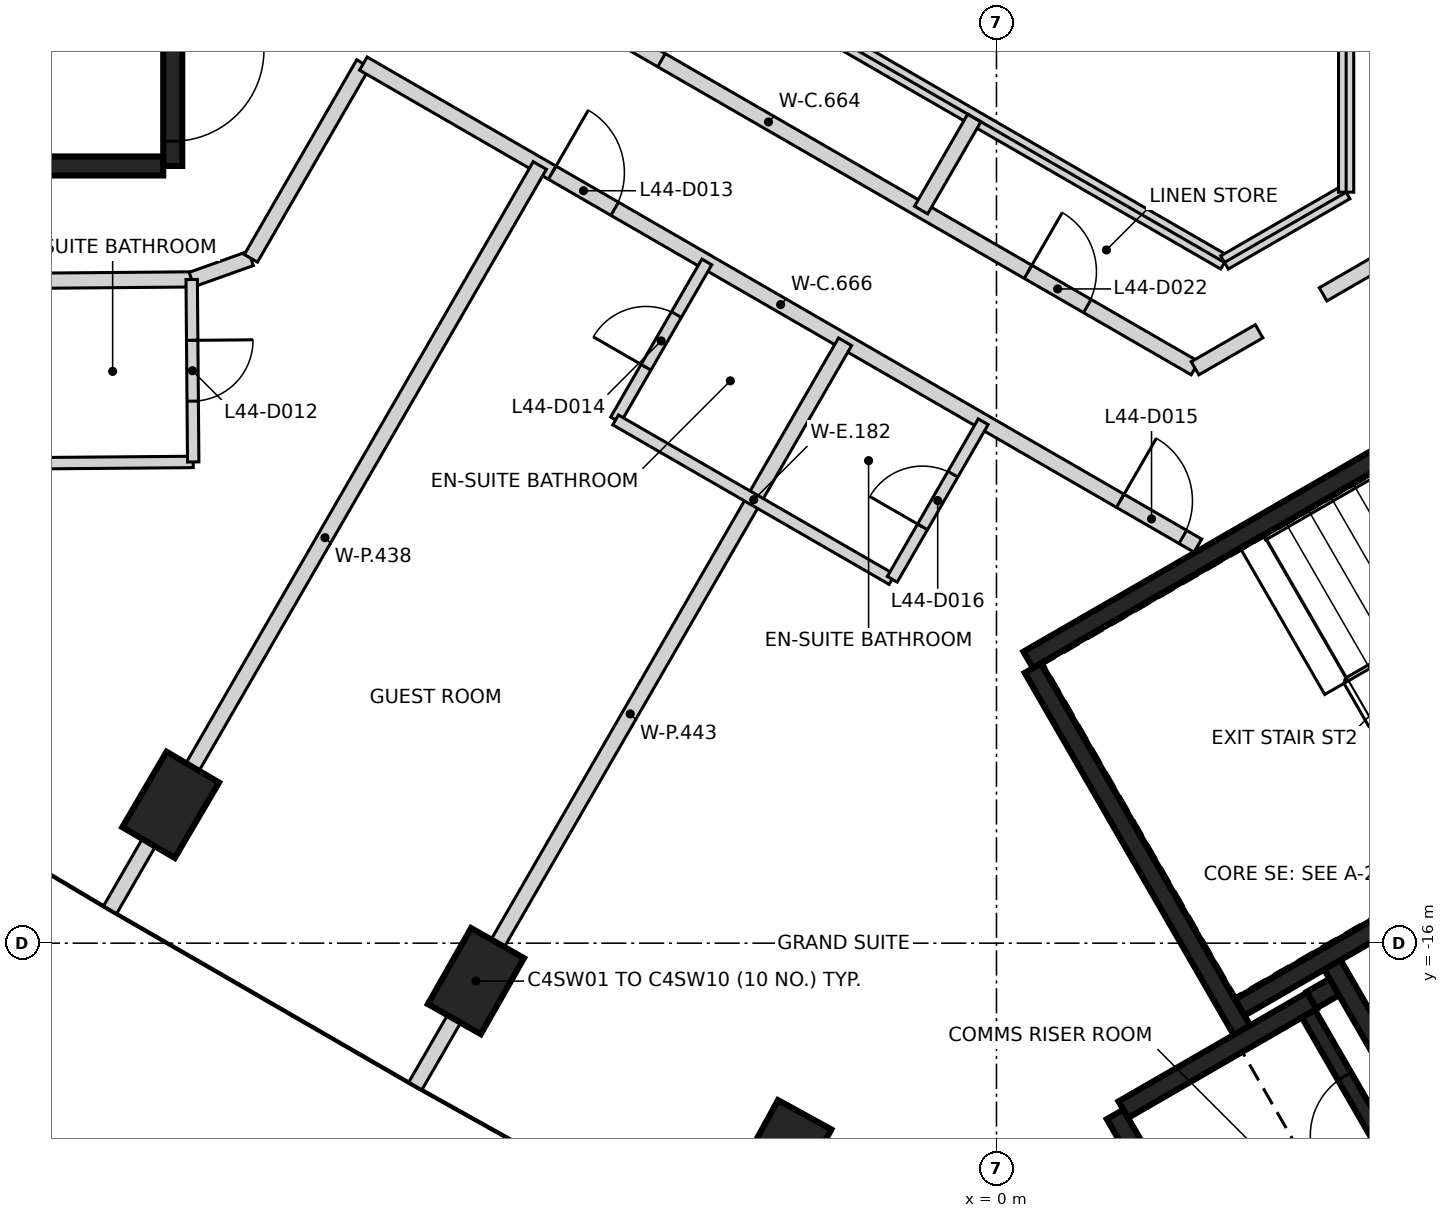
"""IFC4 building model, lengths in metres.
Left out: names, types, materials, properties, quantities, classifications, styles, units other than length and angle.
Written with IfcOpenShell. Run it as: python <this file> out.ifc"""

import sys

from ifc_helpers import new_model, si_unit, direction, frame, frame_2d, origin, origin_2d, place, context, subcontext, project, spatial, rectangle, extrude, element, fill, save


model = new_model("IFC4")
c1 = context("Model", 3, precision=1e-05, world=origin(), true_north=direction((0.0, 1.0)))
c2 = subcontext(c1, "Body", "Model", "MODEL_VIEW")
j1 = project(units=[si_unit("LENGTHUNIT", "METRE"), si_unit("PLANEANGLEUNIT", "RADIAN")], contexts=[c1])
p1 = place(None, origin())
s1 = spatial("IfcSite", under=j1, at=p1, CompositionType="ELEMENT")
p2 = place(p1, origin())
s2 = spatial("IfcBuilding", under=s1, at=p2, CompositionType="ELEMENT")
p3 = place(p2, frame((0.0, 0.0, 179.2)))
s3 = spatial("IfcBuildingStorey", under=s2, at=p3, CompositionType="ELEMENT", Elevation=179.2)
for number, where, z_axis, x_axis in (
    (1, (-10.864, -14.18, -0.35), (0.0, 0.0, 1.0), (0.506, 0.862, 0.0)),
    (2, (-6.848, -16.499, -0.35), (0.0, 0.0, 1.0), (0.494, 0.87, 0.0)),
    (3, (-2.8, -18.762, -0.35), (0.0, 0.0, 1.0), (0.482, 0.876, 0.0)),
):
    element("IfcColumn", number, at=place(p3, frame(where, z_axis=z_axis, x_axis=x_axis)), inside=s3, PredefinedType="COLUMN", context=c2, shape_type="SweptSolid", body=[
        extrude(rectangle(XDim=1.15, YDim=0.8, at=origin_2d()), origin(), (0.0, 0.0, 1.0), 3.6),
    ])
p4 = place(p3, frame((-10.837, 5.775, 0.0), z_axis=(0.0, 0.0, 1.0), x_axis=(0.0, -1.0, 0.0)))
e4 = element("IfcWall", 4, at=p4, inside=s3, PredefinedType="SHEAR", context=c2, shape_type="SweptSolid", body=[
    extrude(rectangle(XDim=11.55, YDim=0.25, at=frame_2d((5.775, 0.0))), origin(), (0.0, 0.0, 1.0), 3.25),
])
p5 = place(p4, frame((10.025, 0.0, 0.0)))
e5 = element("IfcOpeningElement", 5, at=p5, cuts=e4, PredefinedType="OPENING", context=c2, shape_type="SweptSolid", body=[
    extrude(rectangle(XDim=1.2, YDim=2.1, at=frame_2d((0.6, 1.05))), frame((0.0, 0.135, 0.0), z_axis=(0.0, -1.0, 0.0), x_axis=(1.0, 0.0, 0.0)), (0.0, 0.0, 1.0), 0.27),
])
p6 = place(p4, frame((8.725, 0.0, 0.0)))
e6 = element("IfcOpeningElement", 6, at=p6, cuts=e4, PredefinedType="OPENING", context=c2, shape_type="SweptSolid", body=[
    extrude(rectangle(XDim=1.2, YDim=2.1, at=frame_2d((0.6, 1.05))), frame((0.0, 0.135, 0.0), z_axis=(0.0, -1.0, 0.0), x_axis=(1.0, 0.0, 0.0)), (0.0, 0.0, 1.0), 0.27),
])
p7 = place(p3, frame((-10.963, -5.775, 0.0), z_axis=(0.0, 0.0, 1.0), x_axis=(-1.0, 0.0, 0.0)))
e7 = element("IfcWall", 7, at=p7, inside=s3, PredefinedType="SHEAR", context=c2, shape_type="SweptSolid", body=[
    extrude(rectangle(XDim=5.225, YDim=0.25, at=frame_2d((2.612, 0.0))), origin(), (0.0, 0.0, 1.0), 3.25),
])
p8 = place(p3, frame((0.417, -12.273, 0.0), z_axis=(0.0, 0.0, 1.0), x_axis=(0.866021906294, 0.500006057782, 0.0)))
e8 = element("IfcWall", 8, at=p8, inside=s3, PredefinedType="SHEAR", context=c2, shape_type="SweptSolid", body=[
    extrude(rectangle(XDim=11.55, YDim=0.25, at=frame_2d((5.775, 0.0))), origin(), (0.0, 0.0, 1.0), 3.25),
])
p9 = place(p8, frame((10.025, 0.0, 0.0)))
e9 = element("IfcOpeningElement", 9, at=p9, cuts=e8, PredefinedType="OPENING", context=c2, shape_type="SweptSolid", body=[
    extrude(rectangle(XDim=1.2, YDim=2.1, at=frame_2d((0.6, 1.05))), frame((0.0, 0.135, 0.0), z_axis=(0.0, -1.0, 0.0), x_axis=(1.0, 0.0, 0.0)), (0.0, 0.0, 1.0), 0.27),
])
p10 = place(p8, frame((8.725, 0.0, 0.0)))
e10 = element("IfcOpeningElement", 10, at=p10, cuts=e8, PredefinedType="OPENING", context=c2, shape_type="SweptSolid", body=[
    extrude(rectangle(XDim=1.2, YDim=2.1, at=frame_2d((0.6, 1.05))), frame((0.0, 0.135, 0.0), z_axis=(0.0, -1.0, 0.0), x_axis=(1.0, 0.0, 0.0)), (0.0, 0.0, 1.0), 0.27),
])
p11 = place(p3, frame((3.235, -17.153, 0.0), z_axis=(0.0, 0.0, 1.0), x_axis=(-0.500008851346, 0.866020293397, 0.0)))
e11 = element("IfcWall", 11, at=p11, inside=s3, PredefinedType="SHEAR", context=c2, shape_type="SweptSolid", body=[
    extrude(rectangle(XDim=5.51, YDim=0.25, at=frame_2d((2.755, 0.0))), origin(), (0.0, 0.0, 1.0), 3.25),
])
p12 = place(p3, frame((3.085, -20.894, 0.0), z_axis=(0.0, 0.0, 1.0), x_axis=(-0.499978833458, 0.866037623948, 0.0)))
e12 = element("IfcWall", 12, at=p12, inside=s3, PredefinedType="SHEAR", context=c2, shape_type="SweptSolid", body=[
    extrude(rectangle(XDim=3.05, YDim=0.25, at=frame_2d((1.525, 0.0))), origin(), (0.0, 0.0, 1.0), 3.25),
])
p13 = place(p3, frame((1.669, -18.19, 0.0), z_axis=(0.0, 0.0, 1.0), x_axis=(0.866042235819, 0.499970844928, 0.0)))
e13 = element("IfcWall", 13, at=p13, inside=s3, PredefinedType="SHEAR", context=c2, shape_type="SweptSolid", body=[
    extrude(rectangle(XDim=2.865, YDim=0.25, at=frame_2d((1.432, 0.0))), origin(), (0.0, 0.0, 1.0), 3.25),
])
p14 = place(p3, frame((4.414, -16.276, 0.0), z_axis=(0.0, 0.0, 1.0), x_axis=(0.500003324108, -0.866023484601, 0.0)))
e14 = element("IfcWall", 14, at=p14, inside=s3, PredefinedType="SHEAR", context=c2, shape_type="SweptSolid", body=[
    extrude(rectangle(XDim=3.085, YDim=0.25, at=frame_2d((1.542, 0.0))), origin(), (0.0, 0.0, 1.0), 3.25),
])
p15 = place(p3, frame((5.322, -15.619, 0.0), z_axis=(0.0, 0.0, 1.0), x_axis=(-0.866026229868, -0.499998569178, 0.0)))
e15 = element("IfcWall", 15, at=p15, inside=s3, PredefinedType="SHEAR", context=c2, shape_type="SweptSolid", body=[
    extrude(rectangle(XDim=2.449, YDim=0.25, at=frame_2d((1.225, 0.0))), origin(), (0.0, 0.0, 1.0), 3.25),
])
p16 = place(p3, frame((4.145, -16.749, 0.0), z_axis=(0.0, 0.0, 1.0), x_axis=(0.866185586049, 0.49972245349, 0.0)))
e16 = element("IfcWall", 16, at=p16, inside=s3, PredefinedType="SHEAR", context=c2, shape_type="SweptSolid", body=[
    extrude(rectangle(XDim=0.344, YDim=0.25, at=frame_2d((0.172, 0.0))), origin(), (0.0, 0.0, 1.0), 3.25),
])
p17 = place(p3, frame((5.503, -19.352, 0.0), z_axis=(0.0, 0.0, 1.0), x_axis=(-0.499986818241, 0.866033014143, 0.0)))
e17 = element("IfcWall", 17, at=p17, inside=s3, PredefinedType="SHEAR", context=c2, shape_type="SweptSolid", body=[
    extrude(rectangle(XDim=2.798, YDim=0.2, at=frame_2d((1.399, 0.0))), origin(), (0.0, 0.0, 1.0), 3.25),
])
p18 = place(p17, frame((0.949, 0.0, 0.0)))
e18 = element("IfcOpeningElement", 18, at=p18, cuts=e17, PredefinedType="OPENING", context=c2, shape_type="SweptSolid", body=[
    extrude(rectangle(XDim=0.9, YDim=2.1, at=frame_2d((0.45, 1.05))), frame((0.0, 0.11, 0.0), z_axis=(0.0, -1.0, 0.0), x_axis=(1.0, 0.0, 0.0)), (0.0, 0.0, 1.0), 0.22),
])
p19 = place(p3, frame((-20.944, -7.356, 0.0), z_axis=(0.0, 0.0, 1.0), x_axis=(0.999963588164, 0.008533600955, 0.0)))
e19 = element("IfcWall", 19, at=p19, inside=s3, PredefinedType="PARTITIONING", context=c2, shape_type="SweptSolid", body=[
    extrude(rectangle(XDim=10.357, YDim=0.2, at=frame_2d((5.178, 0.0))), origin(), (0.0, 0.0, 1.0), 3.25),
])
p20 = place(p19, frame((0.437, 0.0, 0.0)))
e20 = element("IfcOpeningElement", 20, at=p20, cuts=e19, PredefinedType="OPENING", context=c2, shape_type="SweptSolid", body=[
    extrude(rectangle(XDim=1.0, YDim=2.1, at=frame_2d((0.5, 1.05))), frame((0.0, 0.11, 0.0), z_axis=(0.0, -1.0, 0.0), x_axis=(1.0, 0.0, 0.0)), (0.0, 0.0, 1.0), 0.22),
])
p21 = place(p19, frame((4.968, 0.0, 0.0)))
e21 = element("IfcOpeningElement", 21, at=p21, cuts=e19, PredefinedType="OPENING", context=c2, shape_type="SweptSolid", body=[
    extrude(rectangle(XDim=0.95, YDim=2.1, at=frame_2d((0.475, 1.05))), frame((0.0, 0.11, 0.0), z_axis=(0.0, -1.0, 0.0), x_axis=(1.0, 0.0, 0.0)), (0.0, 0.0, 1.0), 0.22),
])
p22 = place(p3, frame((-10.588, -7.269, 0.0), z_axis=(0.0, 0.0, 1.0), x_axis=(0.941634876095, 0.336635945974, 0.0)))
e22 = element("IfcWall", 22, at=p22, inside=s3, PredefinedType="PARTITIONING", context=c2, shape_type="SweptSolid", body=[
    extrude(rectangle(XDim=0.826, YDim=0.2, at=frame_2d((0.413, 0.0))), origin(), (0.0, 0.0, 1.0), 3.25),
])
p23 = place(p3, frame((-9.809, -6.99, 0.0), z_axis=(0.0, 0.0, 1.0), x_axis=(0.499955822529, 0.866050908157, 0.0)))
e23 = element("IfcWall", 23, at=p23, inside=s3, PredefinedType="PARTITIONING", context=c2, shape_type="SweptSolid", body=[
    extrude(rectangle(XDim=2.958, YDim=0.2, at=frame_2d((1.479, 0.0))), origin(), (0.0, 0.0, 1.0), 3.25),
])
p24 = place(p3, frame((-8.612, -1.956, 0.0), z_axis=(0.0, 0.0, 1.0), x_axis=(0.866034386606, -0.499984440973, 0.0)))
e24 = element("IfcWall", 24, at=p24, inside=s3, PredefinedType="PARTITIONING", context=c2, shape_type="SweptSolid", body=[
    extrude(rectangle(XDim=12.96, YDim=0.2, at=frame_2d((6.48, 0.0))), origin(), (0.0, 0.0, 1.0), 3.25),
])
p25 = place(p24, frame((3.955, 0.0, 0.0)))
e25 = element("IfcOpeningElement", 25, at=p25, cuts=e24, PredefinedType="OPENING", context=c2, shape_type="SweptSolid", body=[
    extrude(rectangle(XDim=0.9, YDim=2.1, at=frame_2d((0.45, 1.05))), frame((0.0, 0.11, 0.0), z_axis=(0.0, -1.0, 0.0), x_axis=(1.0, 0.0, 0.0)), (0.0, 0.0, 1.0), 0.22),
])
p26 = place(p24, frame((10.424, 0.0, 0.0)))
e26 = element("IfcOpeningElement", 26, at=p26, cuts=e24, PredefinedType="OPENING", context=c2, shape_type="SweptSolid", body=[
    extrude(rectangle(XDim=0.9, YDim=2.1, at=frame_2d((0.45, 1.05))), frame((0.0, 0.11, 0.0), z_axis=(0.0, -1.0, 0.0), x_axis=(1.0, 0.0, 0.0)), (0.0, 0.0, 1.0), 0.22),
])
p27 = place(p3, frame((-8.33, -4.428, 0.0), z_axis=(0.0, 0.0, 1.0), x_axis=(0.865923263811, -0.500176869909, 0.0)))
e27 = element("IfcWall", 27, at=p27, inside=s3, PredefinedType="PARTITIONING", context=c2, shape_type="SweptSolid", body=[
    extrude(rectangle(XDim=12.68, YDim=0.2, at=frame_2d((6.34, 0.0))), origin(), (0.0, 0.0, 1.0), 3.25),
])
p28 = place(p27, frame((2.87, 0.0, 0.0)))
e28 = element("IfcOpeningElement", 28, at=p28, cuts=e27, PredefinedType="OPENING", context=c2, shape_type="SweptSolid", body=[
    extrude(rectangle(XDim=0.95, YDim=2.1, at=frame_2d((0.475, 1.05))), frame((0.0, 0.11, 0.0), z_axis=(0.0, -1.0, 0.0), x_axis=(1.0, 0.0, 0.0)), (0.0, 0.0, 1.0), 0.22),
])
p29 = place(p27, frame((11.5, 0.0, 0.0)))
e29 = element("IfcOpeningElement", 29, at=p29, cuts=e27, PredefinedType="OPENING", context=c2, shape_type="SweptSolid", body=[
    extrude(rectangle(XDim=0.95, YDim=2.1, at=frame_2d((0.475, 1.05))), frame((0.0, 0.11, 0.0), z_axis=(0.0, -1.0, 0.0), x_axis=(1.0, 0.0, 0.0)), (0.0, 0.0, 1.0), 0.22),
])
p30 = place(p3, frame((2.612, -8.437, 0.0), z_axis=(0.0, 0.0, 1.0), x_axis=(0.866026830048, 0.499997529631, 0.0)))
e30 = element("IfcWall", 30, at=p30, inside=s3, PredefinedType="PARTITIONING", context=c2, shape_type="SweptSolid", body=[
    extrude(rectangle(XDim=0.973, YDim=0.2, at=frame_2d((0.487, 0.0))), origin(), (0.0, 0.0, 1.0), 3.25),
])
p31 = place(p3, frame((4.297, -7.464, 0.0), z_axis=(0.0, 0.0, 1.0), x_axis=(0.866026378386, 0.499998311937, 0.0)))
e31 = element("IfcWall", 31, at=p31, inside=s3, PredefinedType="PARTITIONING", context=c2, shape_type="SweptSolid", body=[
    extrude(rectangle(XDim=1.966, YDim=0.2, at=frame_2d((0.983, 0.0))), origin(), (0.0, 0.0, 1.0), 3.25),
])
p32 = place(p3, frame((-11.661, -15.561, 0.0), z_axis=(0.0, 0.0, 1.0), x_axis=(0.500012795616, 0.866018016106, 0.0)))
e32 = element("IfcWall", 32, at=p32, inside=s3, PredefinedType="PARTITIONING", context=c2, shape_type="SweptSolid", body=[
    extrude(rectangle(XDim=11.306, YDim=0.2, at=frame_2d((5.653, 0.0))), origin(), (0.0, 0.0, 1.0), 3.25),
])
p33 = place(p3, frame((-7.6, -0.924, 0.0), z_axis=(0.0, 0.0, 1.0), x_axis=(0.866028806638, -0.499994106039, 0.0)))
e33 = element("IfcWall", 33, at=p33, inside=s3, PredefinedType="PARTITIONING", context=c2, shape_type="SweptSolid", body=[
    extrude(rectangle(XDim=12.24, YDim=0.2, at=frame_2d((6.12, 0.0))), origin(), (0.0, 0.0, 1.0), 3.25),
])
p34 = place(p3, frame((-7.646, -17.879, 0.0), z_axis=(0.0, 0.0, 1.0), x_axis=(0.500031496802, 0.866007218334, 0.0)))
e34 = element("IfcWall", 34, at=p34, inside=s3, PredefinedType="PARTITIONING", context=c2, shape_type="SweptSolid", body=[
    extrude(rectangle(XDim=11.306, YDim=0.2, at=frame_2d((5.653, 0.0))), origin(), (0.0, 0.0, 1.0), 3.25),
])
p35 = place(p3, frame((-0.992, -6.355, 0.0), z_axis=(0.0, 0.0, 1.0), x_axis=(0.500059638837, 0.865990968548, 0.0)))
e35 = element("IfcWall", 35, at=p35, inside=s3, PredefinedType="PARTITIONING", context=c2, shape_type="SweptSolid", body=[
    extrude(rectangle(XDim=1.4, YDim=0.2, at=frame_2d((0.7, 0.0))), origin(), (0.0, 0.0, 1.0), 3.25),
])
p36 = place(p3, frame((3.0, -7.044, 0.0), z_axis=(0.0, 0.0, 1.0), x_axis=(0.865875248522, 0.500259986404, 0.0)))
e36 = element("IfcWall", 36, at=p36, inside=s3, PredefinedType="PARTITIONING", context=c2, shape_type="SweptSolid", body=[
    extrude(rectangle(XDim=1.848, YDim=0.2, at=frame_2d((0.924, 0.0))), origin(), (0.0, 0.0, 1.0), 3.25),
])
p37 = place(p3, frame((4.6, -6.12, 0.0), z_axis=(0.0, 0.0, 1.0), x_axis=(0.0, 1.0, 0.0)))
e37 = element("IfcWall", 37, at=p37, inside=s3, PredefinedType="PARTITIONING", context=c2, shape_type="SweptSolid", body=[
    extrude(rectangle(XDim=12.24, YDim=0.2, at=frame_2d((6.12, 0.0))), origin(), (0.0, 0.0, 1.0), 3.25),
])
p38 = place(p3, frame((-12.668, -9.686, 0.0), z_axis=(0.0, 0.0, 1.0), x_axis=(0.999966883333, 0.008138319013, 0.0)))
e38 = element("IfcWall", 38, at=p38, inside=s3, PredefinedType="PARTITIONING", context=c2, shape_type="SweptSolid", body=[
    extrude(rectangle(XDim=2.1, YDim=0.15, at=frame_2d((1.05, 0.0))), origin(), (0.0, 0.0, 1.0), 3.25),
])
p39 = place(p3, frame((-10.588, -7.269, 0.0), z_axis=(0.0, 0.0, 1.0), x_axis=(0.008239801651, -0.999966052258, 0.0)))
e39 = element("IfcWall", 39, at=p39, inside=s3, PredefinedType="PARTITIONING", context=c2, shape_type="SweptSolid", body=[
    extrude(rectangle(XDim=2.4, YDim=0.15, at=frame_2d((1.2, 0.0))), origin(), (0.0, 0.0, 1.0), 3.25),
])
p40 = place(p39, frame((0.8, 0.0, 0.0)))
e40 = element("IfcOpeningElement", 40, at=p40, cuts=e39, PredefinedType="OPENING", context=c2, shape_type="SweptSolid", body=[
    extrude(rectangle(XDim=0.8, YDim=2.1, at=frame_2d((0.4, 1.05))), frame((0.0, 0.085, 0.0), z_axis=(0.0, -1.0, 0.0), x_axis=(1.0, 0.0, 0.0)), (0.0, 0.0, 1.0), 0.17),
])
p41 = place(p3, frame((-5.011, -9.116, 0.0), z_axis=(0.0, 0.0, 1.0), x_axis=(0.500089422704, 0.865973769406, 0.0)))
e41 = element("IfcWall", 41, at=p41, inside=s3, PredefinedType="PARTITIONING", context=c2, shape_type="SweptSolid", body=[
    extrude(rectangle(XDim=2.399, YDim=0.15, at=frame_2d((1.2, 0.0))), origin(), (0.0, 0.0, 1.0), 3.25),
])
p42 = place(p41, frame((0.8, 0.0, 0.0)))
e42 = element("IfcOpeningElement", 42, at=p42, cuts=e41, PredefinedType="OPENING", context=c2, shape_type="SweptSolid", body=[
    extrude(rectangle(XDim=0.8, YDim=2.1, at=frame_2d((0.4, 1.05))), frame((0.0, 0.085, 0.0), z_axis=(0.0, -1.0, 0.0), x_axis=(1.0, 0.0, 0.0)), (0.0, 0.0, 1.0), 0.17),
])
p43 = place(p3, frame((-5.011, -9.116, 0.0), z_axis=(0.0, 0.0, 1.0), x_axis=(0.866062607352, -0.499935555993, 0.0)))
e43 = element("IfcWall", 43, at=p43, inside=s3, PredefinedType="PARTITIONING", context=c2, shape_type="SweptSolid", body=[
    extrude(rectangle(XDim=4.198, YDim=0.15, at=frame_2d((2.099, 0.0))), origin(), (0.0, 0.0, 1.0), 3.25),
])
p44 = place(p3, frame((-1.371, -11.213, 0.0), z_axis=(0.0, 0.0, 1.0), x_axis=(0.499748946523, 0.866170301066, 0.0)))
e44 = element("IfcWall", 44, at=p44, inside=s3, PredefinedType="PARTITIONING", context=c2, shape_type="SweptSolid", body=[
    extrude(rectangle(XDim=2.393, YDim=0.15, at=frame_2d((1.197, 0.0))), origin(), (0.0, 0.0, 1.0), 3.25),
])
p45 = place(p44, frame((0.796, 0.0, 0.0)))
e45 = element("IfcOpeningElement", 45, at=p45, cuts=e44, PredefinedType="OPENING", context=c2, shape_type="SweptSolid", body=[
    extrude(rectangle(XDim=0.8, YDim=2.1, at=frame_2d((0.4, 1.05))), frame((0.0, 0.085, 0.0), z_axis=(0.0, -1.0, 0.0), x_axis=(1.0, 0.0, 0.0)), (0.0, 0.0, 1.0), 0.17),
])
p46 = place(p5, origin())
e46 = element("IfcDoor", 46, at=p46, inside=s3, OperationType="SINGLE_SWING_LEFT", PredefinedType="DOOR", context=c2, shape_type="SweptSolid", body=[
    extrude(rectangle(XDim=1.2, YDim=2.1, at=frame_2d((0.6, 1.05))), frame((0.0, 0.025, 0.0), z_axis=(0.0, -1.0, 0.0), x_axis=(1.0, 0.0, 0.0)), (0.0, 0.0, 1.0), 0.05),
])
fill(e5, e46)
p47 = place(p18, origin())
e47 = element("IfcDoor", 47, at=p47, inside=s3, OperationType="SINGLE_SWING_RIGHT", PredefinedType="DOOR", context=c2, shape_type="SweptSolid", body=[
    extrude(rectangle(XDim=0.9, YDim=2.1, at=frame_2d((0.45, 1.05))), frame((0.0, 0.025, 0.0), z_axis=(0.0, -1.0, 0.0), x_axis=(1.0, 0.0, 0.0)), (0.0, 0.0, 1.0), 0.05),
])
fill(e18, e47)
p48 = place(p40, frame((0.8, 0.0, 0.0), z_axis=(0.0, 0.0, 1.0), x_axis=(-1.0, 0.0, 0.0)))
e48 = element("IfcDoor", 48, at=p48, inside=s3, OperationType="SINGLE_SWING_LEFT", PredefinedType="DOOR", context=c2, shape_type="SweptSolid", body=[
    extrude(rectangle(XDim=0.8, YDim=2.1, at=frame_2d((0.4, 1.05))), frame((0.0, 0.025, 0.0), z_axis=(0.0, -1.0, 0.0), x_axis=(1.0, 0.0, 0.0)), (0.0, 0.0, 1.0), 0.05),
])
fill(e40, e48)
p49 = place(p28, frame((0.95, 0.0, 0.0), z_axis=(0.0, 0.0, 1.0), x_axis=(-1.0, 0.0, 0.0)))
e49 = element("IfcDoor", 49, at=p49, inside=s3, OperationType="SINGLE_SWING_LEFT", PredefinedType="DOOR", context=c2, shape_type="SweptSolid", body=[
    extrude(rectangle(XDim=0.95, YDim=2.1, at=frame_2d((0.475, 1.05))), frame((0.0, 0.025, 0.0), z_axis=(0.0, -1.0, 0.0), x_axis=(1.0, 0.0, 0.0)), (0.0, 0.0, 1.0), 0.05),
])
fill(e28, e49)
p50 = place(p42, origin())
e50 = element("IfcDoor", 50, at=p50, inside=s3, OperationType="SINGLE_SWING_LEFT", PredefinedType="DOOR", context=c2, shape_type="SweptSolid", body=[
    extrude(rectangle(XDim=0.8, YDim=2.1, at=frame_2d((0.4, 1.05))), frame((0.0, 0.025, 0.0), z_axis=(0.0, -1.0, 0.0), x_axis=(1.0, 0.0, 0.0)), (0.0, 0.0, 1.0), 0.05),
])
fill(e42, e50)
p51 = place(p29, frame((0.95, 0.0, 0.0), z_axis=(0.0, 0.0, 1.0), x_axis=(-1.0, 0.0, 0.0)))
e51 = element("IfcDoor", 51, at=p51, inside=s3, OperationType="SINGLE_SWING_LEFT", PredefinedType="DOOR", context=c2, shape_type="SweptSolid", body=[
    extrude(rectangle(XDim=0.95, YDim=2.1, at=frame_2d((0.475, 1.05))), frame((0.0, 0.025, 0.0), z_axis=(0.0, -1.0, 0.0), x_axis=(1.0, 0.0, 0.0)), (0.0, 0.0, 1.0), 0.05),
])
fill(e29, e51)
p52 = place(p45, frame((0.8, 0.0, 0.0), z_axis=(0.0, 0.0, 1.0), x_axis=(-1.0, 0.0, 0.0)))
e52 = element("IfcDoor", 52, at=p52, inside=s3, OperationType="SINGLE_SWING_LEFT", PredefinedType="DOOR", context=c2, shape_type="SweptSolid", body=[
    extrude(rectangle(XDim=0.8, YDim=2.1, at=frame_2d((0.4, 1.05))), frame((0.0, 0.025, 0.0), z_axis=(0.0, -1.0, 0.0), x_axis=(1.0, 0.0, 0.0)), (0.0, 0.0, 1.0), 0.05),
])
fill(e45, e52)
p53 = place(p25, origin())
e53 = element("IfcDoor", 53, at=p53, inside=s3, OperationType="SINGLE_SWING_LEFT", PredefinedType="DOOR", context=c2, shape_type="SweptSolid", body=[
    extrude(rectangle(XDim=0.9, YDim=2.1, at=frame_2d((0.45, 1.05))), frame((0.0, 0.025, 0.0), z_axis=(0.0, -1.0, 0.0), x_axis=(1.0, 0.0, 0.0)), (0.0, 0.0, 1.0), 0.05),
])
fill(e25, e53)
p54 = place(p26, origin())
e54 = element("IfcDoor", 54, at=p54, inside=s3, OperationType="SINGLE_SWING_LEFT", PredefinedType="DOOR", context=c2, shape_type="SweptSolid", body=[
    extrude(rectangle(XDim=0.9, YDim=2.1, at=frame_2d((0.45, 1.05))), frame((0.0, 0.025, 0.0), z_axis=(0.0, -1.0, 0.0), x_axis=(1.0, 0.0, 0.0)), (0.0, 0.0, 1.0), 0.05),
])
fill(e26, e54)
save(model, sys.argv[1])
